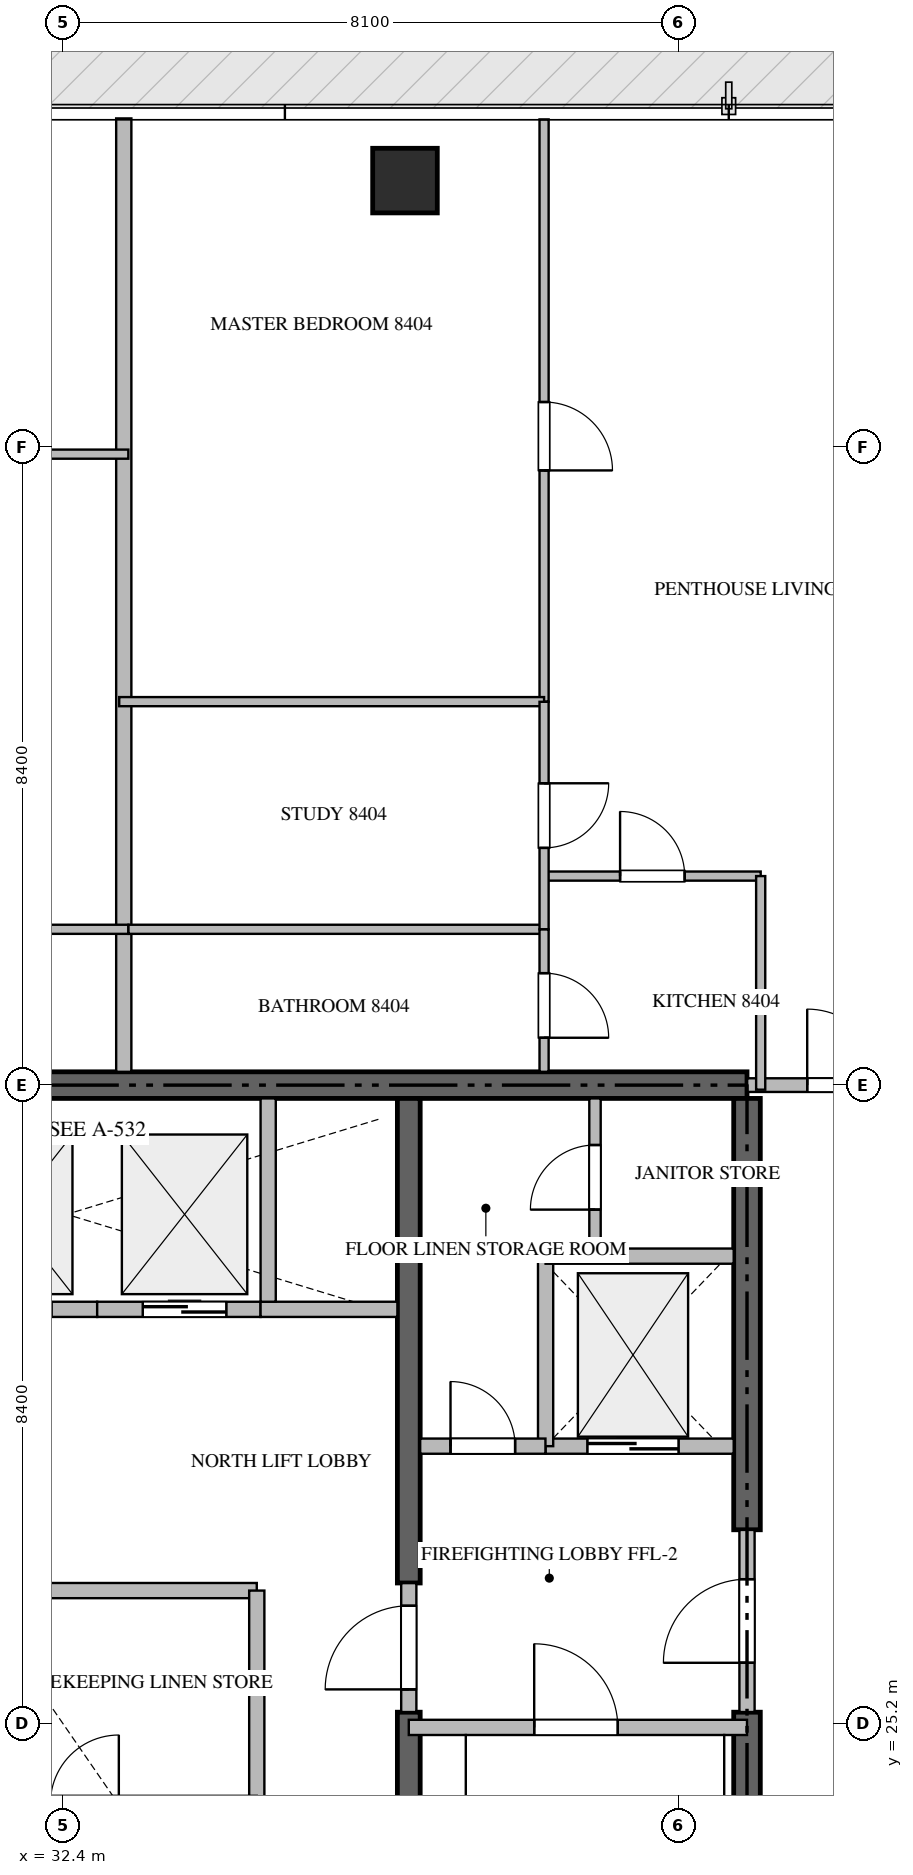
"""IFC4 building model, lengths in metres.
Left out: names, types, materials, properties, quantities, classifications, styles, units other than length and angle.
Written with IfcOpenShell. Run it as: python <this file> out.ifc"""

import sys

from ifc_helpers import new_model, si_unit, direction, frame, frame_2d, origin, origin_2d, place, context, subcontext, project, spatial, rectangle, extrude, source, transform, mapped, element, fill, save


model = new_model("IFC4")
c1 = context("Model", 3, precision=1e-05, world=origin(), true_north=direction((0.0, 1.0)))
c2 = subcontext(c1, "Body", "Model", "MODEL_VIEW")
j1 = project(units=[si_unit("LENGTHUNIT", "METRE"), si_unit("PLANEANGLEUNIT", "RADIAN")], contexts=[c1])
p1 = place(None, origin())
s1 = spatial("IfcSite", under=j1, at=p1, CompositionType="ELEMENT")
p2 = place(p1, origin())
s2 = spatial("IfcBuilding", under=s1, at=p2, CompositionType="ELEMENT")
p3 = place(p2, frame((0.0, 0.0, 338.0)))
s3 = spatial("IfcBuildingStorey", under=s2, at=p3, CompositionType="ELEMENT", Elevation=338.0)
p4 = place(p3, frame((41.4, 33.6, -0.44), z_axis=(0.0, 0.0, 1.0), x_axis=(-1.0, 0.0, 0.0)))
e1 = element("IfcWall", 1, at=p4, inside=s3, PredefinedType="SHEAR", context=c2, shape_type="SweptSolid", body=[
    extrude(rectangle(XDim=18.0, YDim=0.35, at=frame_2d((9.0, 0.0))), origin(), (0.0, 0.0, 1.0), 4.228),
])
p5 = place(p3, frame((41.4, 16.975, -0.44), z_axis=(0.0, 0.0, 1.0), x_axis=(0.0, 1.0, 0.0)))
e2 = element("IfcWall", 2, at=p5, inside=s3, PredefinedType="SHEAR", context=c2, shape_type="SweptSolid", body=[
    extrude(rectangle(XDim=8.375, YDim=0.35, at=frame_2d((4.188, 0.0))), origin(), (0.0, 0.0, 1.0), 4.228),
])
p6 = place(p3, frame((41.4, 27.75, -0.44), z_axis=(0.0, 0.0, 1.0), x_axis=(0.0, 1.0, 0.0)))
e3 = element("IfcWall", 3, at=p6, inside=s3, PredefinedType="SHEAR", context=c2, shape_type="SweptSolid", body=[
    extrude(rectangle(XDim=5.675, YDim=0.35, at=frame_2d((2.837, 0.0))), origin(), (0.0, 0.0, 1.0), 4.228),
])
p7 = place(p3, frame((36.95, 16.975, -0.44), z_axis=(0.0, 0.0, 1.0), x_axis=(0.0, 1.0, 0.0)))
e4 = element("IfcWall", 4, at=p7, inside=s3, PredefinedType="SHEAR", context=c2, shape_type="SweptSolid", body=[
    extrude(rectangle(XDim=8.375, YDim=0.3, at=frame_2d((4.188, 0.0))), origin(), (0.0, 0.0, 1.0), 4.228),
])
p8 = place(p3, frame((36.95, 27.05, -0.44), z_axis=(0.0, 0.0, 1.0), x_axis=(0.0, 1.0, 0.0)))
e5 = element("IfcWall", 5, at=p8, inside=s3, PredefinedType="SHEAR", context=c2, shape_type="SweptSolid", body=[
    extrude(rectangle(XDim=6.375, YDim=0.3, at=frame_2d((3.188, 0.0))), origin(), (0.0, 0.0, 1.0), 4.228),
])
m1 = source(origin(), c2, "Body", "SweptSolid", [
    extrude(rectangle(XDim=0.85, YDim=0.85, at=origin_2d()), origin(), (0.0, 0.0, 1.0), 4.23),
])
p9 = place(p3, frame((36.9, 45.5, -0.44), z_axis=(0.0, 0.0, 1.0), x_axis=(1.0, 0.0, 0.0)))
e6 = element("IfcColumn", 6, at=p9, inside=s3, PredefinedType="COLUMN", context=c2, shape_type="MappedRepresentation", body=[
    mapped(m1, transform((0.0, 0.0, 0.0), scale=1.0)),
])
p10 = place(p3, frame((36.95, 25.15, 0.0), z_axis=(0.0, 0.0, 1.0), x_axis=(1.0, 0.0, 0.0)))
e7 = element("IfcWall", 7, at=p10, inside=s3, PredefinedType="STANDARD", context=c2, shape_type="SweptSolid", body=[
    extrude(rectangle(XDim=4.45, YDim=0.2, at=frame_2d((2.225, 0.0))), origin(), (0.0, 0.0, 1.0), 3.79),
])
p11 = place(p10, frame((1.65, 0.0, 0.0)))
e8 = element("IfcOpeningElement", 8, at=p11, cuts=e7, PredefinedType="OPENING", context=c2, shape_type="SweptSolid", body=[
    extrude(rectangle(XDim=1.1, YDim=2.15, at=frame_2d((0.55, 1.075))), frame((0.0, 0.11, 0.0), z_axis=(0.0, -1.0, 0.0), x_axis=(1.0, 0.0, 0.0)), (0.0, 0.0, 1.0), 0.22),
])
p12 = place(p3, frame((38.75, 28.85, 0.0), z_axis=(0.0, 0.0, 1.0), x_axis=(1.0, 0.0, 0.0)))
e9 = element("IfcWall", 9, at=p12, inside=s3, PredefinedType="STANDARD", context=c2, shape_type="SweptSolid", body=[
    extrude(rectangle(XDim=2.475, YDim=0.2, at=frame_2d((1.238, 0.0))), origin(), (0.0, 0.0, 1.0), 3.79),
])
p13 = place(p12, frame((0.55, 0.0, 0.0)))
e10 = element("IfcOpeningElement", 10, at=p13, cuts=e9, PredefinedType="OPENING", context=c2, shape_type="SweptSolid", body=[
    extrude(rectangle(XDim=1.2, YDim=2.2, at=frame_2d((0.6, 1.1))), frame((0.0, 0.11, 0.0), z_axis=(0.0, -1.0, 0.0), x_axis=(1.0, 0.0, 0.0)), (0.0, 0.0, 1.0), 0.22),
])
p14 = place(p3, frame((30.55, 30.65, 0.0), z_axis=(0.0, 0.0, 1.0), x_axis=(1.0, 0.0, 0.0)))
e11 = element("IfcWall", 11, at=p14, inside=s3, PredefinedType="STANDARD", context=c2, shape_type="SweptSolid", body=[
    extrude(rectangle(XDim=2.3, YDim=0.2, at=frame_2d((1.15, 0.0))), origin(), (0.0, 0.0, 1.0), 3.79),
])
p15 = place(p14, frame((0.6, 0.0, 0.0)))
e12 = element("IfcOpeningElement", 12, at=p15, cuts=e11, PredefinedType="OPENING", context=c2, shape_type="SweptSolid", body=[
    extrude(rectangle(XDim=1.1, YDim=2.2, at=frame_2d((0.55, 1.1))), frame((0.0, 0.11, 0.0), z_axis=(0.0, -1.0, 0.0), x_axis=(1.0, 0.0, 0.0)), (0.0, 0.0, 1.0), 0.22),
])
p16 = place(p3, frame((32.85, 30.65, 0.0), z_axis=(0.0, 0.0, 1.0), x_axis=(1.0, 0.0, 0.0)))
e13 = element("IfcWall", 13, at=p16, inside=s3, PredefinedType="STANDARD", context=c2, shape_type="SweptSolid", body=[
    extrude(rectangle(XDim=2.15, YDim=0.2, at=frame_2d((1.075, 0.0))), origin(), (0.0, 0.0, 1.0), 3.79),
])
p17 = place(p16, frame((0.6, 0.0, 0.0)))
e14 = element("IfcOpeningElement", 14, at=p17, cuts=e13, PredefinedType="OPENING", context=c2, shape_type="SweptSolid", body=[
    extrude(rectangle(XDim=1.1, YDim=2.2, at=frame_2d((0.55, 1.1))), frame((0.0, 0.11, 0.0), z_axis=(0.0, -1.0, 0.0), x_axis=(1.0, 0.0, 0.0)), (0.0, 0.0, 1.0), 0.22),
])
p18 = place(p3, frame((35.0, 30.65, 0.0), z_axis=(0.0, 0.0, 1.0), x_axis=(1.0, 0.0, 0.0)))
e15 = element("IfcWall", 15, at=p18, inside=s3, PredefinedType="STANDARD", context=c2, shape_type="SweptSolid", body=[
    extrude(rectangle(XDim=1.8, YDim=0.2, at=frame_2d((0.9, 0.0))), origin(), (0.0, 0.0, 1.0), 3.79),
])
p19 = place(p3, frame((35.1, 30.75, 0.0), z_axis=(0.0, 0.0, 1.0), x_axis=(0.0, 1.0, 0.0)))
e16 = element("IfcWall", 16, at=p19, inside=s3, PredefinedType="STANDARD", context=c2, shape_type="SweptSolid", body=[
    extrude(rectangle(XDim=2.675, YDim=0.2, at=frame_2d((1.337, 0.0))), origin(), (0.0, 0.0, 1.0), 3.79),
])
p20 = place(p3, frame((38.75, 28.85, 0.0), z_axis=(0.0, 0.0, 1.0), x_axis=(0.0, 1.0, 0.0)))
e17 = element("IfcWall", 17, at=p20, inside=s3, PredefinedType="STANDARD", context=c2, shape_type="SweptSolid", body=[
    extrude(rectangle(XDim=2.5, YDim=0.2, at=frame_2d((1.25, 0.0))), origin(), (0.0, 0.0, 1.0), 3.79),
])
p21 = place(p3, frame((38.75, 31.35, 0.0), z_axis=(0.0, 0.0, 1.0), x_axis=(1.0, 0.0, 0.0)))
e18 = element("IfcWall", 18, at=p21, inside=s3, PredefinedType="STANDARD", context=c2, shape_type="SweptSolid", body=[
    extrude(rectangle(XDim=2.475, YDim=0.2, at=frame_2d((1.238, 0.0))), origin(), (0.0, 0.0, 1.0), 3.79),
])
p22 = place(p3, frame((37.1, 28.85, 0.0), z_axis=(0.0, 0.0, 1.0), x_axis=(1.0, 0.0, 0.0)))
e19 = element("IfcWall", 19, at=p22, inside=s3, PredefinedType="STANDARD", context=c2, shape_type="SweptSolid", body=[
    extrude(rectangle(XDim=1.648, YDim=0.2, at=frame_2d((0.824, 0.0))), origin(), (0.0, 0.0, 1.0), 3.79),
])
p23 = place(p22, frame((0.399, 0.0, 0.0)))
e20 = element("IfcOpeningElement", 20, at=p23, cuts=e19, PredefinedType="OPENING", context=c2, shape_type="SweptSolid", body=[
    extrude(rectangle(XDim=0.85, YDim=2.1, at=frame_2d((0.425, 1.05))), frame((0.0, 0.11, 0.0), z_axis=(0.0, -1.0, 0.0), x_axis=(1.0, 0.0, 0.0)), (0.0, 0.0, 1.0), 0.22),
])
p24 = place(p3, frame((41.4, 25.352, 0.0), z_axis=(0.0, 0.0, 1.0), x_axis=(0.0, 1.0, 0.0)))
e21 = element("IfcWall", 21, at=p24, inside=s3, PredefinedType="STANDARD", context=c2, shape_type="SweptSolid", body=[
    extrude(rectangle(XDim=2.396, YDim=0.2, at=frame_2d((1.198, 0.0))), origin(), (0.0, 0.0, 1.0), 3.79),
])
p25 = place(p24, frame((0.648, 0.0, 0.0)))
e22 = element("IfcOpeningElement", 22, at=p25, cuts=e21, PredefinedType="OPENING", context=c2, shape_type="SweptSolid", body=[
    extrude(rectangle(XDim=1.1, YDim=2.15, at=frame_2d((0.55, 1.075))), frame((0.0, 0.11, 0.0), z_axis=(0.0, -1.0, 0.0), x_axis=(1.0, 0.0, 0.0)), (0.0, 0.0, 1.0), 0.22),
])
p26 = place(p3, frame((36.95, 25.352, 0.0), z_axis=(0.0, 0.0, 1.0), x_axis=(0.0, 1.0, 0.0)))
e23 = element("IfcWall", 23, at=p26, inside=s3, PredefinedType="STANDARD", context=c2, shape_type="SweptSolid", body=[
    extrude(rectangle(XDim=1.696, YDim=0.2, at=frame_2d((0.848, 0.0))), origin(), (0.0, 0.0, 1.0), 3.79),
])
p27 = place(p26, frame((0.298, 0.0, 0.0)))
e24 = element("IfcOpeningElement", 24, at=p27, cuts=e23, PredefinedType="OPENING", context=c2, shape_type="SweptSolid", body=[
    extrude(rectangle(XDim=1.1, YDim=2.15, at=frame_2d((0.55, 1.075))), frame((0.0, 0.11, 0.0), z_axis=(0.0, -1.0, 0.0), x_axis=(1.0, 0.0, 0.0)), (0.0, 0.0, 1.0), 0.22),
])
p28 = place(p3, frame((39.4, 31.35, 0.0), z_axis=(0.0, 0.0, 1.0), x_axis=(0.0, 1.0, 0.0)))
e25 = element("IfcWall", 25, at=p28, inside=s3, PredefinedType="PARTITIONING", context=c2, shape_type="SweptSolid", body=[
    extrude(rectangle(XDim=2.075, YDim=0.15, at=frame_2d((1.038, 0.0))), origin(), (0.0, 0.0, 1.0), 3.79),
])
p29 = place(p28, frame((0.612, 0.0, 0.0)))
e26 = element("IfcOpeningElement", 26, at=p29, cuts=e25, PredefinedType="OPENING", context=c2, shape_type="SweptSolid", body=[
    extrude(rectangle(XDim=0.85, YDim=2.1, at=frame_2d((0.425, 1.05))), frame((0.0, 0.085, 0.0), z_axis=(0.0, -1.0, 0.0), x_axis=(1.0, 0.0, 0.0)), (0.0, 0.0, 1.0), 0.17),
])
p30 = place(p3, frame((28.0, 26.95, 0.0), z_axis=(0.0, 0.0, 1.0), x_axis=(1.0, 0.0, 0.0)))
e27 = element("IfcWall", 27, at=p30, inside=s3, PredefinedType="STANDARD", context=c2, shape_type="SweptSolid", body=[
    extrude(rectangle(XDim=6.95, YDim=0.2, at=frame_2d((3.475, 0.0))), origin(), (0.0, 0.0, 1.0), 3.79),
])
p31 = place(p3, frame((34.95, 24.15, 0.0), z_axis=(0.0, 0.0, 1.0), x_axis=(0.0, 1.0, 0.0)))
e28 = element("IfcWall", 28, at=p31, inside=s3, PredefinedType="STANDARD", context=c2, shape_type="SweptSolid", body=[
    extrude(rectangle(XDim=2.8, YDim=0.2, at=frame_2d((1.4, 0.0))), origin(), (0.0, 0.0, 1.0), 3.79),
])
p32 = place(p3, frame((33.2, 33.775, 0.0), z_axis=(0.0, 0.0, 1.0), x_axis=(0.0, 1.0, 0.0)))
e29 = element("IfcWall", 29, at=p32, inside=s3, PredefinedType="PARTITIONING", context=c2, shape_type="SweptSolid", body=[
    extrude(rectangle(XDim=12.543, YDim=0.2, at=frame_2d((6.271, 0.0))), origin(), (0.0, 0.0, 1.0), 3.79),
])
p33 = place(p3, frame((41.402, 33.6, 0.0), z_axis=(0.0, 0.0, 1.0), x_axis=(1.0, 0.0, 0.0)))
e30 = element("IfcWall", 30, at=p33, inside=s3, PredefinedType="PARTITIONING", context=c2, shape_type="SweptSolid", body=[
    extrude(rectangle(XDim=2.496, YDim=0.18, at=frame_2d((1.248, 0.0))), origin(), (0.0, 0.0, 1.0), 3.79),
])
p34 = place(p33, frame((0.79, 0.0, 0.0)))
e31 = element("IfcOpeningElement", 31, at=p34, cuts=e30, PredefinedType="OPENING", context=c2, shape_type="SweptSolid", body=[
    extrude(rectangle(XDim=1.0, YDim=2.15, at=frame_2d((0.5, 1.075))), frame((0.0, 0.1, 0.0), z_axis=(0.0, -1.0, 0.0), x_axis=(1.0, 0.0, 0.0)), (0.0, 0.0, 1.0), 0.2),
])
for number, where, z_axis, x_axis in (
    (32, (26.3, 41.901, 0.0), (0.0, 0.0, 1.0), (1.0, 0.0, 0.0)),
    (33, (26.3, 35.65, 0.0), (0.0, 0.0, 1.0), (1.0, 0.0, 0.0)),
):
    element("IfcWall", number, at=place(p3, frame(where, z_axis=z_axis, x_axis=x_axis)), inside=s3, PredefinedType="PARTITIONING", context=c2, shape_type="SweptSolid", body=[
        extrude(rectangle(XDim=6.96, YDim=0.12, at=frame_2d((3.48, 0.0))), origin(), (0.0, 0.0, 1.0), 3.79),
    ])
p35 = place(p3, frame((38.73, 36.35, 0.0), z_axis=(0.0, 0.0, 1.0), x_axis=(1.0, 0.0, 0.0)))
e34 = element("IfcWall", 34, at=p35, inside=s3, PredefinedType="PARTITIONING", context=c2, shape_type="SweptSolid", body=[
    extrude(rectangle(XDim=2.85, YDim=0.12, at=frame_2d((1.425, 0.0))), origin(), (0.0, 0.0, 1.0), 3.79),
])
p36 = place(p35, frame((1.0, 0.0, 0.0)))
e35 = element("IfcOpeningElement", 35, at=p36, cuts=e34, PredefinedType="OPENING", context=c2, shape_type="SweptSolid", body=[
    extrude(rectangle(XDim=0.85, YDim=2.1, at=frame_2d((0.425, 1.05))), frame((0.0, 0.07, 0.0), z_axis=(0.0, -1.0, 0.0), x_axis=(1.0, 0.0, 0.0)), (0.0, 0.0, 1.0), 0.14),
])
p37 = place(p3, frame((41.58, 36.35, 0.0), z_axis=(0.0, 0.0, 1.0), x_axis=(0.0, -1.0, 0.0)))
e36 = element("IfcWall", 36, at=p37, inside=s3, PredefinedType="PARTITIONING", context=c2, shape_type="SweptSolid", body=[
    extrude(rectangle(XDim=2.81, YDim=0.12, at=frame_2d((1.405, 0.0))), origin(), (0.0, 0.0, 1.0), 3.79),
])
p38 = place(p3, frame((38.73, 46.305, 0.0), z_axis=(0.0, 0.0, 1.0), x_axis=(0.0, -1.0, 0.0)))
e37 = element("IfcWall", 37, at=p38, inside=s3, PredefinedType="PARTITIONING", context=c2, shape_type="SweptSolid", body=[
    extrude(rectangle(XDim=7.66, YDim=0.12, at=frame_2d((3.83, 0.0))), origin(), (0.0, 0.0, 1.0), 3.79),
])
p39 = place(p38, frame((3.718, 0.0, 0.0)))
e38 = element("IfcOpeningElement", 38, at=p39, cuts=e37, PredefinedType="OPENING", context=c2, shape_type="SweptSolid", body=[
    extrude(rectangle(XDim=0.9, YDim=2.1, at=frame_2d((0.45, 1.05))), frame((0.0, 0.07, 0.0), z_axis=(0.0, -1.0, 0.0), x_axis=(1.0, 0.0, 0.0)), (0.0, 0.0, 1.0), 0.14),
])
p40 = place(p3, frame((33.14, 38.645, 0.0), z_axis=(0.0, 0.0, 1.0), x_axis=(1.0, 0.0, 0.0)))
e39 = element("IfcWall", 39, at=p40, inside=s3, PredefinedType="PARTITIONING", context=c2, shape_type="SweptSolid", body=[
    extrude(rectangle(XDim=5.59, YDim=0.12, at=frame_2d((2.795, 0.0))), origin(), (0.0, 0.0, 1.0), 3.412),
])
p41 = place(p3, frame((33.262, 35.65, 0.0), z_axis=(0.0, 0.0, 1.0), x_axis=(1.0, 0.0, 0.0)))
e40 = element("IfcWall", 40, at=p41, inside=s3, PredefinedType="PARTITIONING", context=c2, shape_type="SweptSolid", body=[
    extrude(rectangle(XDim=5.468, YDim=0.12, at=frame_2d((2.734, 0.0))), origin(), (0.0, 0.0, 1.0), 3.79),
])
p42 = place(p3, frame((38.73, 38.643, 0.0), z_axis=(0.0, 0.0, 1.0), x_axis=(0.0, -1.0, 0.0)))
e41 = element("IfcWall", 41, at=p42, inside=s3, PredefinedType="PARTITIONING", context=c2, shape_type="SweptSolid", body=[
    extrude(rectangle(XDim=2.993, YDim=0.12, at=frame_2d((1.497, 0.0))), origin(), (0.0, 0.0, 1.0), 3.79),
])
p43 = place(p42, frame((1.072, 0.0, 0.0)))
e42 = element("IfcOpeningElement", 42, at=p43, cuts=e41, PredefinedType="OPENING", context=c2, shape_type="SweptSolid", body=[
    extrude(rectangle(XDim=0.85, YDim=2.1, at=frame_2d((0.425, 1.05))), frame((0.0, 0.07, 0.0), z_axis=(0.0, -1.0, 0.0), x_axis=(1.0, 0.0, 0.0)), (0.0, 0.0, 1.0), 0.14),
])
p44 = place(p3, frame((38.73, 35.648, 0.0), z_axis=(0.0, 0.0, 1.0), x_axis=(0.0, -1.0, 0.0)))
e43 = element("IfcWall", 43, at=p44, inside=s3, PredefinedType="PARTITIONING", context=c2, shape_type="SweptSolid", body=[
    extrude(rectangle(XDim=1.873, YDim=0.12, at=frame_2d((0.937, 0.0))), origin(), (0.0, 0.0, 1.0), 3.79),
])
p45 = place(p44, frame((0.575, 0.0, 0.0)))
e44 = element("IfcOpeningElement", 44, at=p45, cuts=e43, PredefinedType="OPENING", context=c2, shape_type="SweptSolid", body=[
    extrude(rectangle(XDim=0.85, YDim=2.1, at=frame_2d((0.425, 1.05))), frame((0.0, 0.07, 0.0), z_axis=(0.0, -1.0, 0.0), x_axis=(1.0, 0.0, 0.0)), (0.0, 0.0, 1.0), 0.14),
])
m2 = source(origin(), c2, "Body", "SweptSolid", [
    extrude(rectangle(XDim=1.1, YDim=2.15, at=frame_2d((0.55, 1.075))), frame((0.0, 0.025, 0.0), z_axis=(0.0, -1.0, 0.0), x_axis=(1.0, 0.0, 0.0)), (0.0, 0.0, 1.0), 0.05),
])
p46 = place(p11, origin())
e45 = element("IfcDoor", 45, at=p46, inside=s3, OperationType="SINGLE_SWING_LEFT", PredefinedType="DOOR", context=c2, shape_type="MappedRepresentation", body=[
    mapped(m2, transform((0.0, 0.0, 0.0), scale=1.0)),
])
fill(e8, e45)
m3 = source(origin(), c2, "Body", "SweptSolid", [
    extrude(rectangle(XDim=1.2, YDim=2.2, at=frame_2d((0.6, 1.1))), frame((0.0, 0.025, 0.0), z_axis=(0.0, -1.0, 0.0), x_axis=(1.0, 0.0, 0.0)), (0.0, 0.0, 1.0), 0.05),
])
p47 = place(p13, origin())
e46 = element("IfcDoor", 46, at=p47, inside=s3, OperationType="DOUBLE_DOOR_SLIDING", PredefinedType="DOOR", context=c2, shape_type="MappedRepresentation", body=[
    mapped(m3, transform((0.0, 0.0, 0.0), scale=1.0)),
])
fill(e10, e46)
m4 = source(origin(), c2, "Body", "SweptSolid", [
    extrude(rectangle(XDim=1.1, YDim=2.2, at=frame_2d((0.55, 1.1))), frame((0.0, 0.025, 0.0), z_axis=(0.0, -1.0, 0.0), x_axis=(1.0, 0.0, 0.0)), (0.0, 0.0, 1.0), 0.05),
])
p48 = place(p17, origin())
e47 = element("IfcDoor", 47, at=p48, inside=s3, OperationType="DOUBLE_DOOR_SLIDING", PredefinedType="DOOR", context=c2, shape_type="MappedRepresentation", body=[
    mapped(m4, transform((0.0, 0.0, 0.0), scale=1.0)),
])
fill(e14, e47)
m5 = source(origin(), c2, "Body", "SweptSolid", [
    extrude(rectangle(XDim=0.85, YDim=2.1, at=frame_2d((0.425, 1.05))), frame((0.0, 0.025, 0.0), z_axis=(0.0, -1.0, 0.0), x_axis=(1.0, 0.0, 0.0)), (0.0, 0.0, 1.0), 0.05),
])
p49 = place(p23, origin())
e48 = element("IfcDoor", 48, at=p49, inside=s3, OperationType="SINGLE_SWING_LEFT", PredefinedType="DOOR", context=c2, shape_type="MappedRepresentation", body=[
    mapped(m5, transform((0.0, 0.0, 0.0), scale=1.0)),
])
fill(e20, e48)
p50 = place(p25, origin())
e49 = element("IfcDoor", 49, at=p50, inside=s3, OperationType="SINGLE_SWING_LEFT", PredefinedType="DOOR", context=c2, shape_type="MappedRepresentation", body=[
    mapped(m2, transform((0.0, 0.0, 0.0), scale=1.0)),
])
fill(e22, e49)
p51 = place(p27, origin())
e50 = element("IfcDoor", 50, at=p51, inside=s3, OperationType="SINGLE_SWING_LEFT", PredefinedType="DOOR", context=c2, shape_type="MappedRepresentation", body=[
    mapped(m2, transform((0.0, 0.0, 0.0), scale=1.0)),
])
fill(e24, e50)
p52 = place(p29, origin())
e51 = element("IfcDoor", 51, at=p52, inside=s3, OperationType="SINGLE_SWING_LEFT", PredefinedType="DOOR", context=c2, shape_type="MappedRepresentation", body=[
    mapped(m5, transform((0.0, 0.0, 0.0), scale=1.0)),
])
fill(e26, e51)
m6 = source(origin(), c2, "Body", "SweptSolid", [
    extrude(rectangle(XDim=1.0, YDim=2.15, at=frame_2d((0.5, 1.075))), frame((0.0, 0.025, 0.0), z_axis=(0.0, -1.0, 0.0), x_axis=(1.0, 0.0, 0.0)), (0.0, 0.0, 1.0), 0.05),
])
p53 = place(p34, origin())
e52 = element("IfcDoor", 52, at=p53, inside=s3, OperationType="SINGLE_SWING_LEFT", PredefinedType="DOOR", context=c2, shape_type="MappedRepresentation", body=[
    mapped(m6, transform((0.0, 0.0, 0.0), scale=1.0)),
])
fill(e31, e52)
p54 = place(p36, origin())
e53 = element("IfcDoor", 53, at=p54, inside=s3, OperationType="SINGLE_SWING_LEFT", PredefinedType="DOOR", context=c2, shape_type="MappedRepresentation", body=[
    mapped(m5, transform((0.0, 0.0, 0.0), scale=1.0)),
])
fill(e35, e53)
m7 = source(origin(), c2, "Body", "SweptSolid", [
    extrude(rectangle(XDim=0.9, YDim=2.1, at=frame_2d((0.45, 1.05))), frame((0.0, 0.025, 0.0), z_axis=(0.0, -1.0, 0.0), x_axis=(1.0, 0.0, 0.0)), (0.0, 0.0, 1.0), 0.05),
])
p55 = place(p39, origin())
e54 = element("IfcDoor", 54, at=p55, inside=s3, OperationType="SINGLE_SWING_RIGHT", PredefinedType="DOOR", context=c2, shape_type="MappedRepresentation", body=[
    mapped(m7, transform((0.0, 0.0, 0.0), scale=1.0)),
])
fill(e38, e54)
p56 = place(p43, origin())
e55 = element("IfcDoor", 55, at=p56, inside=s3, OperationType="SINGLE_SWING_LEFT", PredefinedType="DOOR", context=c2, shape_type="MappedRepresentation", body=[
    mapped(m5, transform((0.0, 0.0, 0.0), scale=1.0)),
])
fill(e42, e55)
p57 = place(p45, origin())
e56 = element("IfcDoor", 56, at=p57, inside=s3, OperationType="SINGLE_SWING_RIGHT", PredefinedType="DOOR", context=c2, shape_type="MappedRepresentation", body=[
    mapped(m5, transform((0.0, 0.0, 0.0), scale=1.0)),
])
fill(e44, e56)
save(model, sys.argv[1])
